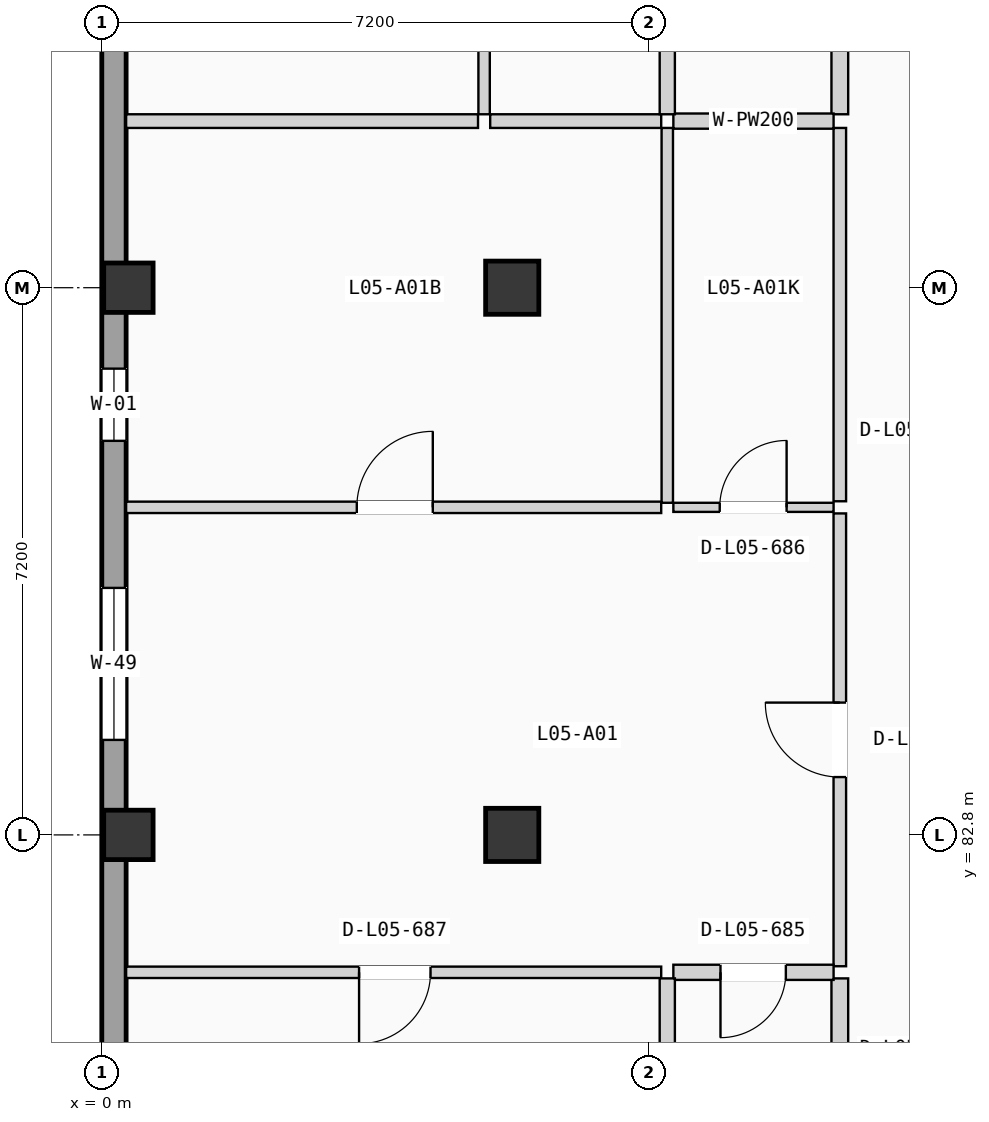
"""IFC4 building model, lengths in metres.
Left out: names, types, materials, properties, quantities, classifications, styles, units other than length and angle.
Written with IfcOpenShell. Run it as: python <this file> out.ifc"""

import sys

from ifc_helpers import new_model, si_unit, direction, frame, frame_2d, origin, origin_2d, place, context, subcontext, project, spatial, rectangle, extrude, element, fill, save


model = new_model("IFC4")
c1 = context("Model", 3, precision=1e-05, world=origin(), true_north=direction((0.0, 1.0)))
c2 = subcontext(c1, "Body", "Model", "MODEL_VIEW")
j1 = project(units=[si_unit("LENGTHUNIT", "METRE"), si_unit("PLANEANGLEUNIT", "RADIAN")], contexts=[c1])
p1 = place(None, origin())
s1 = spatial("IfcSite", under=j1, at=p1, CompositionType="ELEMENT")
p2 = place(p1, origin())
s2 = spatial("IfcBuilding", under=s1, at=p2, CompositionType="ELEMENT")
p3 = place(p2, frame((0.0, 0.0, 18.375)))
s3 = spatial("IfcBuildingStorey", under=s2, at=p3, CompositionType="ELEMENT", Elevation=18.375)
for number, where, z_axis, x_axis in (
    (1, (0.35, 82.8, 0.0), (0.0, 0.0, 1.0), (1.0, 0.0, 0.0)),
    (2, (0.35, 90.0, 0.0), (0.0, 0.0, 1.0), (1.0, 0.0, 0.0)),
):
    element("IfcColumn", number, at=place(p3, frame(where, z_axis=z_axis, x_axis=x_axis)), inside=s3, PredefinedType="COLUMN", context=c2, shape_type="SweptSolid", body=[
        extrude(rectangle(XDim=0.65, YDim=0.65, at=origin_2d()), origin(), (0.0, 0.0, 1.0), 3.15),
    ])
for number, where, z_axis, x_axis in (
    (3, (5.4, 82.8, 0.0), (0.0, 0.0, 1.0), (1.0, 0.0, 0.0)),
    (4, (5.4, 90.0, 0.0), (0.0, 0.0, 1.0), (1.0, 0.0, 0.0)),
):
    element("IfcColumn", number, at=place(p3, frame(where, z_axis=z_axis, x_axis=x_axis)), inside=s3, PredefinedType="COLUMN", context=c2, shape_type="SweptSolid", body=[
        extrude(rectangle(XDim=0.7, YDim=0.7, at=origin_2d()), origin(), (0.0, 0.0, 1.0), 3.15),
    ])
p4 = place(p3, frame((0.16, 68.72, 0.0), z_axis=(0.0, 0.0, 1.0), x_axis=(0.0, 1.0, 0.0)))
e5 = element("IfcWall", 5, at=p4, inside=s3, PredefinedType="SOLIDWALL", context=c2, shape_type="SweptSolid", body=[
    extrude(rectangle(XDim=49.76, YDim=0.32, at=frame_2d((24.88, 0.0))), origin(), (0.0, 0.0, 1.0), 2.89),
])
p5 = place(p4, frame((15.33, 0.0, 0.555)))
e6 = element("IfcOpeningElement", 6, at=p5, cuts=e5, PredefinedType="OPENING", context=c2, shape_type="SweptSolid", body=[
    extrude(rectangle(XDim=2.0, YDim=1.65, at=frame_2d((1.0, 0.825))), frame((0.0, 0.17, 0.0), z_axis=(0.0, -1.0, 0.0), x_axis=(1.0, 0.0, 0.0)), (0.0, 0.0, 1.0), 0.34),
])
p6 = place(p4, frame((9.261, 0.0, 0.85)))
e7 = element("IfcOpeningElement", 7, at=p6, cuts=e5, PredefinedType="OPENING", context=c2, shape_type="SweptSolid", body=[
    extrude(rectangle(XDim=0.95, YDim=1.2, at=frame_2d((0.475, 0.6))), frame((0.0, 0.17, 0.0), z_axis=(0.0, -1.0, 0.0), x_axis=(1.0, 0.0, 0.0)), (0.0, 0.0, 1.0), 0.34),
])
p7 = place(p4, frame((19.265, 0.0, 0.85)))
e8 = element("IfcOpeningElement", 8, at=p7, cuts=e5, PredefinedType="OPENING", context=c2, shape_type="SweptSolid", body=[
    extrude(rectangle(XDim=0.95, YDim=1.2, at=frame_2d((0.475, 0.6))), frame((0.0, 0.17, 0.0), z_axis=(0.0, -1.0, 0.0), x_axis=(1.0, 0.0, 0.0)), (0.0, 0.0, 1.0), 0.34),
])
p8 = place(p4, frame((31.384, 0.0, 0.855)))
e9 = element("IfcOpeningElement", 9, at=p8, cuts=e5, PredefinedType="OPENING", context=c2, shape_type="SweptSolid", body=[
    extrude(rectangle(XDim=2.15, YDim=1.35, at=frame_2d((1.075, 0.675))), frame((0.0, 0.17, 0.0), z_axis=(0.0, -1.0, 0.0), x_axis=(1.0, 0.0, 0.0)), (0.0, 0.0, 1.0), 0.34),
])
p9 = place(p4, frame((24.811, 0.0, 0.705)))
e10 = element("IfcOpeningElement", 10, at=p9, cuts=e5, PredefinedType="OPENING", context=c2, shape_type="SweptSolid", body=[
    extrude(rectangle(XDim=2.15, YDim=1.5, at=frame_2d((1.075, 0.75))), frame((0.0, 0.17, 0.0), z_axis=(0.0, -1.0, 0.0), x_axis=(1.0, 0.0, 0.0)), (0.0, 0.0, 1.0), 0.34),
])
p10 = place(p4, frame((38.513, 0.0, 0.555)))
e11 = element("IfcOpeningElement", 11, at=p10, cuts=e5, PredefinedType="OPENING", context=c2, shape_type="SweptSolid", body=[
    extrude(rectangle(XDim=2.15, YDim=1.65, at=frame_2d((1.075, 0.825))), frame((0.0, 0.17, 0.0), z_axis=(0.0, -1.0, 0.0), x_axis=(1.0, 0.0, 0.0)), (0.0, 0.0, 1.0), 0.34),
])
p11 = place(p3, frame((9.71, 81.072, 0.0), z_axis=(0.0, 0.0, 1.0), x_axis=(0.0, 1.0, 0.0)))
e12 = element("IfcWall", 12, at=p11, inside=s3, PredefinedType="PARTITIONING", context=c2, shape_type="SweptSolid", body=[
    extrude(rectangle(XDim=5.958, YDim=0.165, at=frame_2d((2.979, 0.0))), origin(), (0.0, 0.0, 1.0), 2.87),
])
p12 = place(p11, frame((2.489, 0.0, 0.0)))
e13 = element("IfcOpeningElement", 13, at=p12, cuts=e12, PredefinedType="OPENING", context=c2, shape_type="SweptSolid", body=[
    extrude(rectangle(XDim=0.98, YDim=2.08, at=frame_2d((0.49, 1.04))), frame((0.0, 0.093, 0.0), z_axis=(0.0, -1.0, 0.0), x_axis=(1.0, 0.0, 0.0)), (0.0, 0.0, 1.0), 0.185),
])
p13 = place(p3, frame((9.71, 76.0, 0.0), z_axis=(0.0, 0.0, 1.0), x_axis=(0.0, 1.0, 0.0)))
e14 = element("IfcWall", 14, at=p13, inside=s3, PredefinedType="PLUMBINGWALL", context=c2, shape_type="SweptSolid", body=[
    extrude(rectangle(XDim=4.912, YDim=0.22, at=frame_2d((2.456, 0.0))), origin(), (0.0, 0.0, 1.0), 2.87),
])
p14 = place(p3, frame((9.71, 87.19, 0.0), z_axis=(0.0, 0.0, 1.0), x_axis=(0.0, 1.0, 0.0)))
e15 = element("IfcWall", 15, at=p14, inside=s3, PredefinedType="PARTITIONING", context=c2, shape_type="SweptSolid", body=[
    extrude(rectangle(XDim=4.912, YDim=0.165, at=frame_2d((2.456, 0.0))), origin(), (0.0, 0.0, 1.0), 2.87),
])
p15 = place(p3, frame((9.71, 92.282, 0.0), z_axis=(0.0, 0.0, 1.0), x_axis=(0.0, 1.0, 0.0)))
e16 = element("IfcWall", 16, at=p15, inside=s3, PredefinedType="PLUMBINGWALL", context=c2, shape_type="SweptSolid", body=[
    extrude(rectangle(XDim=5.785, YDim=0.22, at=frame_2d((2.893, 0.0))), origin(), (0.0, 0.0, 1.0), 2.87),
])
p16 = place(p3, frame((7.52, 80.992, 0.0), z_axis=(0.0, 0.0, 1.0), x_axis=(1.0, 0.0, 0.0)))
e17 = element("IfcWall", 17, at=p16, inside=s3, PredefinedType="PLUMBINGWALL", context=c2, shape_type="SweptSolid", body=[
    extrude(rectangle(XDim=2.108, YDim=0.2, at=frame_2d((1.054, 0.0))), origin(), (0.0, 0.0, 1.0), 2.87),
])
p17 = place(p16, frame((0.62, 0.0, 0.0)))
e18 = element("IfcOpeningElement", 18, at=p17, cuts=e17, PredefinedType="OPENING", context=c2, shape_type="SweptSolid", body=[
    extrude(rectangle(XDim=0.86, YDim=2.0, at=frame_2d((0.43, 1.0))), frame((0.0, 0.11, 0.0), z_axis=(0.0, -1.0, 0.0), x_axis=(1.0, 0.0, 0.0)), (0.0, 0.0, 1.0), 0.22),
])
p18 = place(p3, frame((7.52, 87.11, 0.0), z_axis=(0.0, 0.0, 1.0), x_axis=(1.0, 0.0, 0.0)))
e19 = element("IfcWall", 19, at=p18, inside=s3, PredefinedType="PARTITIONING", context=c2, shape_type="SweptSolid", body=[
    extrude(rectangle(XDim=2.108, YDim=0.12, at=frame_2d((1.054, 0.0))), origin(), (0.0, 0.0, 1.0), 2.87),
])
p19 = place(p18, frame((0.61, 0.0, 0.0)))
e20 = element("IfcOpeningElement", 20, at=p19, cuts=e19, PredefinedType="OPENING", context=c2, shape_type="SweptSolid", body=[
    extrude(rectangle(XDim=0.88, YDim=2.02, at=frame_2d((0.44, 1.01))), frame((0.0, 0.07, 0.0), z_axis=(0.0, -1.0, 0.0), x_axis=(1.0, 0.0, 0.0)), (0.0, 0.0, 1.0), 0.14),
])
p20 = place(p3, frame((0.32, 80.992, 0.0), z_axis=(0.0, 0.0, 1.0), x_axis=(1.0, 0.0, 0.0)))
e21 = element("IfcWall", 21, at=p20, inside=s3, PredefinedType="PARTITIONING", context=c2, shape_type="SweptSolid", body=[
    extrude(rectangle(XDim=7.04, YDim=0.15, at=frame_2d((3.52, 0.0))), origin(), (0.0, 0.0, 1.0), 2.87),
])
p21 = place(p20, frame((3.065, 0.0, 0.0)))
e22 = element("IfcOpeningElement", 22, at=p21, cuts=e21, PredefinedType="OPENING", context=c2, shape_type="SweptSolid", body=[
    extrude(rectangle(XDim=0.94, YDim=2.06, at=frame_2d((0.47, 1.03))), frame((0.0, 0.085, 0.0), z_axis=(0.0, -1.0, 0.0), x_axis=(1.0, 0.0, 0.0)), (0.0, 0.0, 1.0), 0.17),
])
p22 = place(p3, frame((0.32, 87.11, 0.0), z_axis=(0.0, 0.0, 1.0), x_axis=(1.0, 0.0, 0.0)))
e23 = element("IfcWall", 23, at=p22, inside=s3, PredefinedType="PARTITIONING", context=c2, shape_type="SweptSolid", body=[
    extrude(rectangle(XDim=7.04, YDim=0.15, at=frame_2d((3.52, 0.0))), origin(), (0.0, 0.0, 1.0), 2.87),
])
p23 = place(p22, frame((3.035, 0.0, 0.0)))
e24 = element("IfcOpeningElement", 24, at=p23, cuts=e23, PredefinedType="OPENING", context=c2, shape_type="SweptSolid", body=[
    extrude(rectangle(XDim=1.0, YDim=2.06, at=frame_2d((0.5, 1.03))), frame((0.0, 0.085, 0.0), z_axis=(0.0, -1.0, 0.0), x_axis=(1.0, 0.0, 0.0)), (0.0, 0.0, 1.0), 0.17),
])
p24 = place(p3, frame((7.44, 76.0, 0.0), z_axis=(0.0, 0.0, 1.0), x_axis=(0.0, 1.0, 0.0)))
e25 = element("IfcWall", 25, at=p24, inside=s3, PredefinedType="PLUMBINGWALL", context=c2, shape_type="SweptSolid", body=[
    extrude(rectangle(XDim=4.912, YDim=0.2, at=frame_2d((2.456, 0.0))), origin(), (0.0, 0.0, 1.0), 2.87),
])
p25 = place(p3, frame((7.44, 87.17, 0.0), z_axis=(0.0, 0.0, 1.0), x_axis=(0.0, 1.0, 0.0)))
e26 = element("IfcWall", 26, at=p25, inside=s3, PredefinedType="PARTITIONING", context=c2, shape_type="SweptSolid", body=[
    extrude(rectangle(XDim=4.932, YDim=0.15, at=frame_2d((2.466, 0.0))), origin(), (0.0, 0.0, 1.0), 2.87),
])
p26 = place(p3, frame((7.52, 92.192, 0.0), z_axis=(0.0, 0.0, 1.0), x_axis=(1.0, 0.0, 0.0)))
e27 = element("IfcWall", 27, at=p26, inside=s3, PredefinedType="PLUMBINGWALL", context=c2, shape_type="SweptSolid", body=[
    extrude(rectangle(XDim=2.108, YDim=0.2, at=frame_2d((1.054, 0.0))), origin(), (0.0, 0.0, 1.0), 2.87),
])
p27 = place(p3, frame((0.32, 92.192, 0.0), z_axis=(0.0, 0.0, 1.0), x_axis=(1.0, 0.0, 0.0)))
e28 = element("IfcWall", 28, at=p27, inside=s3, PredefinedType="PARTITIONING", context=c2, shape_type="SweptSolid", body=[
    extrude(rectangle(XDim=4.63, YDim=0.18, at=frame_2d((2.315, 0.0))), origin(), (0.0, 0.0, 1.0), 2.87),
])
p28 = place(p3, frame((5.11, 92.192, 0.0), z_axis=(0.0, 0.0, 1.0), x_axis=(1.0, 0.0, 0.0)))
e29 = element("IfcWall", 29, at=p28, inside=s3, PredefinedType="PARTITIONING", context=c2, shape_type="SweptSolid", body=[
    extrude(rectangle(XDim=2.25, YDim=0.18, at=frame_2d((1.125, 0.0))), origin(), (0.0, 0.0, 1.0), 2.87),
])
p29 = place(p3, frame((7.44, 92.282, 0.0), z_axis=(0.0, 0.0, 1.0), x_axis=(0.0, 1.0, 0.0)))
e30 = element("IfcWall", 30, at=p29, inside=s3, PredefinedType="PLUMBINGWALL", context=c2, shape_type="SweptSolid", body=[
    extrude(rectangle(XDim=5.805, YDim=0.2, at=frame_2d((2.902, 0.0))), origin(), (0.0, 0.0, 1.0), 2.87),
])
p30 = place(p29, frame((2.467, 0.0, 0.0)))
e31 = element("IfcOpeningElement", 31, at=p30, cuts=e30, PredefinedType="OPENING", context=c2, shape_type="SweptSolid", body=[
    extrude(rectangle(XDim=0.85, YDim=2.01, at=frame_2d((0.425, 1.005))), frame((0.0, 0.11, 0.0), z_axis=(0.0, -1.0, 0.0), x_axis=(1.0, 0.0, 0.0)), (0.0, 0.0, 1.0), 0.22),
])
p31 = place(p3, frame((5.03, 92.282, 0.0), z_axis=(0.0, 0.0, 1.0), x_axis=(0.0, 1.0, 0.0)))
e32 = element("IfcWall", 32, at=p31, inside=s3, PredefinedType="PARTITIONING", context=c2, shape_type="SweptSolid", body=[
    extrude(rectangle(XDim=5.79, YDim=0.15, at=frame_2d((2.895, 0.0))), origin(), (0.0, 0.0, 1.0), 2.87),
])
p32 = place(p5, origin())
e33 = element("IfcWindow", 33, at=p32, inside=s3, PartitioningType="DOUBLE_PANEL_VERTICAL", PredefinedType="WINDOW", context=c2, shape_type="SweptSolid", body=[
    extrude(rectangle(XDim=2.0, YDim=1.65, at=frame_2d((1.0, 0.825))), frame((0.0, 0.03, 0.0), z_axis=(0.0, -1.0, 0.0), x_axis=(1.0, 0.0, 0.0)), (0.0, 0.0, 1.0), 0.06),
])
fill(e6, e33)
p33 = place(p7, origin())
e34 = element("IfcWindow", 34, at=p33, inside=s3, PartitioningType="SINGLE_PANEL", PredefinedType="WINDOW", context=c2, shape_type="SweptSolid", body=[
    extrude(rectangle(XDim=0.95, YDim=1.2, at=frame_2d((0.475, 0.6))), frame((0.0, 0.03, 0.0), z_axis=(0.0, -1.0, 0.0), x_axis=(1.0, 0.0, 0.0)), (0.0, 0.0, 1.0), 0.06),
])
fill(e8, e34)
p34 = place(p12, origin())
e35 = element("IfcDoor", 35, at=p34, inside=s3, OperationType="SINGLE_SWING_RIGHT", PredefinedType="DOOR", context=c2, shape_type="SweptSolid", body=[
    extrude(rectangle(XDim=0.98, YDim=2.08, at=frame_2d((0.49, 1.04))), frame((0.0, 0.025, 0.0), z_axis=(0.0, -1.0, 0.0), x_axis=(1.0, 0.0, 0.0)), (0.0, 0.0, 1.0), 0.05),
])
fill(e13, e35)
p35 = place(p17, frame((0.86, 0.0, 0.0), z_axis=(0.0, 0.0, 1.0), x_axis=(-1.0, 0.0, 0.0)))
e36 = element("IfcDoor", 36, at=p35, inside=s3, OperationType="SINGLE_SWING_LEFT", PredefinedType="DOOR", context=c2, shape_type="SweptSolid", body=[
    extrude(rectangle(XDim=0.86, YDim=2.0, at=frame_2d((0.43, 1.0))), frame((0.0, 0.025, 0.0), z_axis=(0.0, -1.0, 0.0), x_axis=(1.0, 0.0, 0.0)), (0.0, 0.0, 1.0), 0.05),
])
fill(e18, e36)
p36 = place(p19, origin())
e37 = element("IfcDoor", 37, at=p36, inside=s3, OperationType="SINGLE_SWING_RIGHT", PredefinedType="DOOR", context=c2, shape_type="SweptSolid", body=[
    extrude(rectangle(XDim=0.88, YDim=2.02, at=frame_2d((0.44, 1.01))), frame((0.0, 0.025, 0.0), z_axis=(0.0, -1.0, 0.0), x_axis=(1.0, 0.0, 0.0)), (0.0, 0.0, 1.0), 0.05),
])
fill(e20, e37)
p37 = place(p21, frame((0.94, 0.0, 0.0), z_axis=(0.0, 0.0, 1.0), x_axis=(-1.0, 0.0, 0.0)))
e38 = element("IfcDoor", 38, at=p37, inside=s3, OperationType="SINGLE_SWING_LEFT", PredefinedType="DOOR", context=c2, shape_type="SweptSolid", body=[
    extrude(rectangle(XDim=0.94, YDim=2.06, at=frame_2d((0.47, 1.03))), frame((0.0, 0.025, 0.0), z_axis=(0.0, -1.0, 0.0), x_axis=(1.0, 0.0, 0.0)), (0.0, 0.0, 1.0), 0.05),
])
fill(e22, e38)
p38 = place(p23, origin())
e39 = element("IfcDoor", 39, at=p38, inside=s3, OperationType="SINGLE_SWING_RIGHT", PredefinedType="DOOR", context=c2, shape_type="SweptSolid", body=[
    extrude(rectangle(XDim=1.0, YDim=2.06, at=frame_2d((0.5, 1.03))), frame((0.0, 0.025, 0.0), z_axis=(0.0, -1.0, 0.0), x_axis=(1.0, 0.0, 0.0)), (0.0, 0.0, 1.0), 0.05),
])
fill(e24, e39)
save(model, sys.argv[1])
